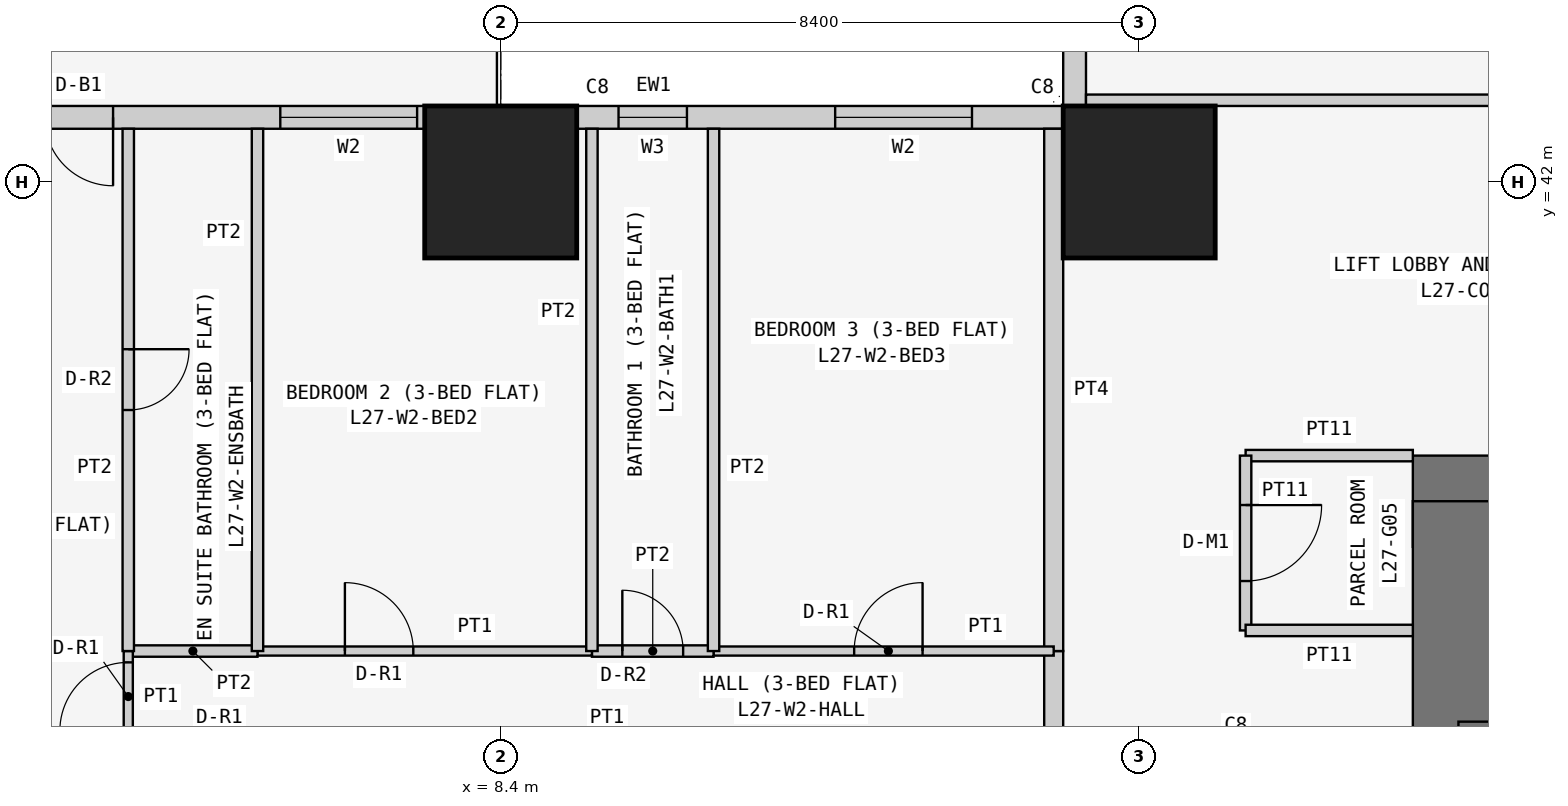
"""IFC4 building model, lengths in metres.
Left out: names, types, materials, properties, quantities, classifications, styles, units other than length and angle.
Written with IfcOpenShell. Run it as: python <this file> out.ifc"""

import sys

from ifc_helpers import new_model, si_unit, direction, frame, frame_2d, origin, origin_2d, place, context, subcontext, project, spatial, rectangle, extrude, element, fill, save


model = new_model("IFC4")
c1 = context("Model", 3, precision=1e-05, world=origin(), true_north=direction((0.0, 1.0)))
c2 = subcontext(c1, "Body", "Model", "MODEL_VIEW")
j1 = project(units=[si_unit("LENGTHUNIT", "METRE"), si_unit("PLANEANGLEUNIT", "RADIAN")], contexts=[c1])
p1 = place(None, origin())
s1 = spatial("IfcSite", under=j1, at=p1, CompositionType="ELEMENT")
p2 = place(p1, origin())
s2 = spatial("IfcBuilding", under=s1, at=p2, CompositionType="ELEMENT")
p3 = place(p2, frame((0.0, 0.0, 108.9)))
s3 = spatial("IfcBuildingStorey", under=s2, at=p3, CompositionType="ELEMENT", Elevation=108.9)
for number, where, z_axis, x_axis in (
    (1, (8.4, 42.0, 0.0), (0.0, 0.0, 1.0), (1.0, 0.0, 0.0)),
    (2, (16.8, 42.0, 0.0), (0.0, 0.0, 1.0), (1.0, 0.0, 0.0)),
):
    element("IfcColumn", number, at=place(p3, frame(where, z_axis=z_axis, x_axis=x_axis)), inside=s3, PredefinedType="COLUMN", context=c2, shape_type="SweptSolid", body=[
        extrude(rectangle(XDim=2.0, YDim=2.0, at=origin_2d()), origin(), (0.0, 0.0, 1.0), 3.6),
    ])
p4 = place(p3, frame((37.8, 37.8, 0.0), z_axis=(0.0, 0.0, 1.0), x_axis=(-1.0, 0.0, 0.0)))
e3 = element("IfcWall", 3, at=p4, inside=s3, PredefinedType="SHEAR", context=c2, shape_type="SweptSolid", body=[
    extrude(rectangle(XDim=17.4, YDim=1.2, at=frame_2d((8.7, 0.0))), origin(), (0.0, 0.0, 1.0), 3.6),
])
p5 = place(p3, frame((21.0, 37.8, 0.0), z_axis=(0.0, 0.0, 1.0), x_axis=(0.0, -1.0, 0.0)))
e4 = element("IfcWall", 4, at=p5, inside=s3, PredefinedType="SHEAR", context=c2, shape_type="SweptSolid", body=[
    extrude(rectangle(XDim=17.4, YDim=1.2, at=frame_2d((8.7, 0.0))), origin(), (0.0, 0.0, 1.0), 3.6),
])
p6 = place(p5, frame((5.4, 0.0, 0.0)))
e5 = element("IfcOpeningElement", 5, at=p6, cuts=e4, PredefinedType="OPENING", context=c2, shape_type="SweptSolid", body=[
    extrude(rectangle(XDim=1.2, YDim=2.1, at=frame_2d((0.6, 1.05))), frame((0.0, 0.61, 0.0), z_axis=(0.0, -1.0, 0.0), x_axis=(1.0, 0.0, 0.0)), (0.0, 0.0, 1.0), 1.22),
])
p7 = place(p3, frame((21.0, 34.6, 0.0), z_axis=(0.0, 0.0, 1.0), x_axis=(1.0, 0.0, 0.0)))
e6 = element("IfcWall", 6, at=p7, inside=s3, PredefinedType="SHEAR", context=c2, shape_type="SweptSolid", body=[
    extrude(rectangle(XDim=11.2, YDim=0.6, at=frame_2d((5.6, 0.0))), origin(), (0.0, 0.0, 1.0), 3.6),
])
p8 = place(p7, frame((9.35, 0.0, 0.0)))
e7 = element("IfcOpeningElement", 7, at=p8, cuts=e6, PredefinedType="OPENING", context=c2, shape_type="SweptSolid", body=[
    extrude(rectangle(XDim=0.9, YDim=2.1, at=frame_2d((0.45, 1.05))), frame((0.0, 0.31, 0.0), z_axis=(0.0, -1.0, 0.0), x_axis=(1.0, 0.0, 0.0)), (0.0, 0.0, 1.0), 0.62),
])
p9 = place(p7, frame((1.0, 0.0, 0.0)))
e8 = element("IfcOpeningElement", 8, at=p9, cuts=e6, PredefinedType="OPENING", context=c2, shape_type="SweptSolid", body=[
    extrude(rectangle(XDim=1.1, YDim=2.1, at=frame_2d((0.55, 1.05))), frame((0.0, 0.31, 0.0), z_axis=(0.0, -1.0, 0.0), x_axis=(1.0, 0.0, 0.0)), (0.0, 0.0, 1.0), 0.62),
])
p10 = place(p7, frame((3.65, 0.0, 0.0)))
e9 = element("IfcOpeningElement", 9, at=p10, cuts=e6, PredefinedType="OPENING", context=c2, shape_type="SweptSolid", body=[
    extrude(rectangle(XDim=1.1, YDim=2.1, at=frame_2d((0.55, 1.05))), frame((0.0, 0.31, 0.0), z_axis=(0.0, -1.0, 0.0), x_axis=(1.0, 0.0, 0.0)), (0.0, 0.0, 1.0), 0.62),
])
p11 = place(p7, frame((6.35, 0.0, 0.0)))
e10 = element("IfcOpeningElement", 10, at=p11, cuts=e6, PredefinedType="OPENING", context=c2, shape_type="SweptSolid", body=[
    extrude(rectangle(XDim=1.3, YDim=2.1, at=frame_2d((0.65, 1.05))), frame((0.0, 0.31, 0.0), z_axis=(0.0, -1.0, 0.0), x_axis=(1.0, 0.0, 0.0)), (0.0, 0.0, 1.0), 0.62),
])
p12 = place(p3, frame((15.8, 42.85, 0.0), z_axis=(0.0, 0.0, 1.0), x_axis=(-1.0, 0.0, 0.0)))
e11 = element("IfcWall", 11, at=p12, inside=s3, PredefinedType="SOLIDWALL", context=c2, shape_type="SweptSolid", body=[
    extrude(rectangle(XDim=15.4, YDim=0.3, at=frame_2d((7.7, 0.0))), origin(), (0.0, 0.0, 1.0), 3.45),
])
p13 = place(p12, frame((1.2, 0.0, 0.9)))
e12 = element("IfcOpeningElement", 12, at=p13, cuts=e11, PredefinedType="OPENING", context=c2, shape_type="SweptSolid", body=[
    extrude(rectangle(XDim=1.8, YDim=1.5, at=frame_2d((0.9, 0.75))), frame((0.0, 0.16, 0.0), z_axis=(0.0, -1.0, 0.0), x_axis=(1.0, 0.0, 0.0)), (0.0, 0.0, 1.0), 0.32),
])
p14 = place(p12, frame((4.95, 0.0, 1.5)))
e13 = element("IfcOpeningElement", 13, at=p14, cuts=e11, PredefinedType="OPENING", context=c2, shape_type="SweptSolid", body=[
    extrude(rectangle(XDim=0.9, YDim=0.7, at=frame_2d((0.45, 0.35))), frame((0.0, 0.16, 0.0), z_axis=(0.0, -1.0, 0.0), x_axis=(1.0, 0.0, 0.0)), (0.0, 0.0, 1.0), 0.32),
])
p15 = place(p12, frame((8.5, 0.0, 0.9)))
e14 = element("IfcOpeningElement", 14, at=p15, cuts=e11, PredefinedType="OPENING", context=c2, shape_type="SweptSolid", body=[
    extrude(rectangle(XDim=1.8, YDim=1.5, at=frame_2d((0.9, 0.75))), frame((0.0, 0.16, 0.0), z_axis=(0.0, -1.0, 0.0), x_axis=(1.0, 0.0, 0.0)), (0.0, 0.0, 1.0), 0.32),
])
p16 = place(p12, frame((12.5, 0.0, 0.0)))
e15 = element("IfcOpeningElement", 15, at=p16, cuts=e11, PredefinedType="OPENING", context=c2, shape_type="SweptSolid", body=[
    extrude(rectangle(XDim=0.9, YDim=2.4, at=frame_2d((0.45, 1.2))), frame((0.0, 0.16, 0.0), z_axis=(0.0, -1.0, 0.0), x_axis=(1.0, 0.0, 0.0)), (0.0, 0.0, 1.0), 0.32),
])
p17 = place(p12, frame((13.5, 0.0, 0.9)))
e16 = element("IfcOpeningElement", 16, at=p17, cuts=e11, PredefinedType="OPENING", context=c2, shape_type="SweptSolid", body=[
    extrude(rectangle(XDim=1.2, YDim=1.5, at=frame_2d((0.6, 0.75))), frame((0.0, 0.16, 0.0), z_axis=(0.0, -1.0, 0.0), x_axis=(1.0, 0.0, 0.0)), (0.0, 0.0, 1.0), 0.32),
])
p18 = place(p3, frame((15.95, 50.0, 0.0), z_axis=(0.0, 0.0, 1.0), x_axis=(0.0, -1.0, 0.0)))
e17 = element("IfcWall", 17, at=p18, inside=s3, PredefinedType="SOLIDWALL", context=c2, shape_type="SweptSolid", body=[
    extrude(rectangle(XDim=7.3, YDim=0.3, at=frame_2d((3.65, 0.0))), origin(), (0.0, 0.0, 1.0), 3.45),
])
p19 = place(p18, frame((3.1, 0.0, 0.9)))
e18 = element("IfcOpeningElement", 18, at=p19, cuts=e17, PredefinedType="OPENING", context=c2, shape_type="SweptSolid", body=[
    extrude(rectangle(XDim=2.4, YDim=1.5, at=frame_2d((1.2, 0.75))), frame((0.0, 0.16, 0.0), z_axis=(0.0, -1.0, 0.0), x_axis=(1.0, 0.0, 0.0)), (0.0, 0.0, 1.0), 0.32),
])
p20 = place(p18, frame((0.75, 0.0, 0.9)))
e19 = element("IfcOpeningElement", 19, at=p20, cuts=e17, PredefinedType="OPENING", context=c2, shape_type="SweptSolid", body=[
    extrude(rectangle(XDim=1.2, YDim=1.5, at=frame_2d((0.6, 0.75))), frame((0.0, 0.16, 0.0), z_axis=(0.0, -1.0, 0.0), x_axis=(1.0, 0.0, 0.0)), (0.0, 0.0, 1.0), 0.32),
])
p21 = place(p3, frame((20.4, 38.4, 0.0), z_axis=(0.0, 0.0, 1.0), x_axis=(-1.0, 0.0, 0.0)))
e20 = element("IfcWall", 20, at=p21, inside=s3, PredefinedType="PARTITIONING", context=c2, shape_type="SweptSolid", body=[
    extrude(rectangle(XDim=2.2, YDim=0.15, at=frame_2d((1.1, 0.0))), origin(), (0.0, 0.0, 1.0), 3.45),
])
p22 = place(p3, frame((18.2, 38.4, 0.0), z_axis=(0.0, 0.0, 1.0), x_axis=(0.0, -1.0, 0.0)))
e21 = element("IfcWall", 21, at=p22, inside=s3, PredefinedType="PARTITIONING", context=c2, shape_type="SweptSolid", body=[
    extrude(rectangle(XDim=2.3, YDim=0.15, at=frame_2d((1.15, 0.0))), origin(), (0.0, 0.0, 1.0), 3.45),
])
p23 = place(p22, frame((0.65, 0.0, 0.0)))
e22 = element("IfcOpeningElement", 22, at=p23, cuts=e21, PredefinedType="OPENING", context=c2, shape_type="SweptSolid", body=[
    extrude(rectangle(XDim=1.0, YDim=2.1, at=frame_2d((0.5, 1.05))), frame((0.0, 0.085, 0.0), z_axis=(0.0, -1.0, 0.0), x_axis=(1.0, 0.0, 0.0)), (0.0, 0.0, 1.0), 0.17),
])
p24 = place(p3, frame((18.2, 36.1, 0.0), z_axis=(0.0, 0.0, 1.0), x_axis=(1.0, 0.0, 0.0)))
e23 = element("IfcWall", 23, at=p24, inside=s3, PredefinedType="PARTITIONING", context=c2, shape_type="SweptSolid", body=[
    extrude(rectangle(XDim=2.2, YDim=0.15, at=frame_2d((1.1, 0.0))), origin(), (0.0, 0.0, 1.0), 3.45),
])
p25 = place(p3, frame((16.1, 43.075, 0.0), z_axis=(0.0, 0.0, 1.0), x_axis=(1.0, 0.0, 0.0)))
e24 = element("IfcWall", 24, at=p25, inside=s3, PredefinedType="PARTITIONING", context=c2, shape_type="SweptSolid", body=[
    extrude(rectangle(XDim=11.557, YDim=0.15, at=frame_2d((5.778, 0.0))), origin(), (0.0, 0.0, 1.0), 3.45),
])
p26 = place(p3, frame((15.675, 34.629, 0.0), z_axis=(0.0, 0.0, 1.0), x_axis=(0.0, 1.0, 0.0)))
e25 = element("IfcWall", 25, at=p26, inside=s3, PredefinedType="PARTITIONING", context=c2, shape_type="SweptSolid", body=[
    extrude(rectangle(XDim=1.2, YDim=0.25, at=frame_2d((0.6, 0.0))), origin(), (0.0, 0.0, 1.0), 3.45),
])
p27 = place(p3, frame((15.675, 35.829, 0.0), z_axis=(0.0, 0.0, 1.0), x_axis=(0.0, 1.0, 0.0)))
e26 = element("IfcWall", 26, at=p27, inside=s3, PredefinedType="PARTITIONING", context=c2, shape_type="SweptSolid", body=[
    extrude(rectangle(XDim=6.871, YDim=0.25, at=frame_2d((3.436, 0.0))), origin(), (0.0, 0.0, 1.0), 3.45),
])
p28 = place(p3, frame((11.2, 35.829, 0.0), z_axis=(0.0, 0.0, 1.0), x_axis=(1.0, 0.0, 0.0)))
e27 = element("IfcWall", 27, at=p28, inside=s3, PredefinedType="PARTITIONING", context=c2, shape_type="SweptSolid", body=[
    extrude(rectangle(XDim=4.475, YDim=0.12, at=frame_2d((2.238, 0.0))), origin(), (0.0, 0.0, 1.0), 3.45),
])
p29 = place(p28, frame((1.85, 0.0, 0.0)))
e28 = element("IfcOpeningElement", 28, at=p29, cuts=e27, PredefinedType="OPENING", context=c2, shape_type="SweptSolid", body=[
    extrude(rectangle(XDim=0.9, YDim=2.1, at=frame_2d((0.45, 1.05))), frame((0.0, 0.07, 0.0), z_axis=(0.0, -1.0, 0.0), x_axis=(1.0, 0.0, 0.0)), (0.0, 0.0, 1.0), 0.14),
])
p30 = place(p3, frame((9.6, 35.829, 0.0), z_axis=(0.0, 0.0, 1.0), x_axis=(1.0, 0.0, 0.0)))
e29 = element("IfcWall", 29, at=p30, inside=s3, PredefinedType="PARTITIONING", context=c2, shape_type="SweptSolid", body=[
    extrude(rectangle(XDim=1.6, YDim=0.15, at=frame_2d((0.8, 0.0))), origin(), (0.0, 0.0, 1.0), 3.45),
])
p31 = place(p30, frame((0.4, 0.0, 0.0)))
e30 = element("IfcOpeningElement", 30, at=p31, cuts=e29, PredefinedType="OPENING", context=c2, shape_type="SweptSolid", body=[
    extrude(rectangle(XDim=0.8, YDim=2.1, at=frame_2d((0.4, 1.05))), frame((0.0, 0.085, 0.0), z_axis=(0.0, -1.0, 0.0), x_axis=(1.0, 0.0, 0.0)), (0.0, 0.0, 1.0), 0.17),
])
p32 = place(p3, frame((5.2, 35.829, 0.0), z_axis=(0.0, 0.0, 1.0), x_axis=(1.0, 0.0, 0.0)))
e31 = element("IfcWall", 31, at=p32, inside=s3, PredefinedType="PARTITIONING", context=c2, shape_type="SweptSolid", body=[
    extrude(rectangle(XDim=4.4, YDim=0.12, at=frame_2d((2.2, 0.0))), origin(), (0.0, 0.0, 1.0), 3.45),
])
p33 = place(p32, frame((1.15, 0.0, 0.0)))
e32 = element("IfcOpeningElement", 32, at=p33, cuts=e31, PredefinedType="OPENING", context=c2, shape_type="SweptSolid", body=[
    extrude(rectangle(XDim=0.9, YDim=2.1, at=frame_2d((0.45, 1.05))), frame((0.0, 0.07, 0.0), z_axis=(0.0, -1.0, 0.0), x_axis=(1.0, 0.0, 0.0)), (0.0, 0.0, 1.0), 0.14),
])
p34 = place(p3, frame((3.5, 35.829, 0.0), z_axis=(0.0, 0.0, 1.0), x_axis=(1.0, 0.0, 0.0)))
e33 = element("IfcWall", 33, at=p34, inside=s3, PredefinedType="PARTITIONING", context=c2, shape_type="SweptSolid", body=[
    extrude(rectangle(XDim=1.7, YDim=0.15, at=frame_2d((0.85, 0.0))), origin(), (0.0, 0.0, 1.0), 3.45),
])
p35 = place(p3, frame((3.5, 34.629, 0.0), z_axis=(0.0, 0.0, 1.0), x_axis=(0.0, 1.0, 0.0)))
e34 = element("IfcWall", 34, at=p35, inside=s3, PredefinedType="PARTITIONING", context=c2, shape_type="SweptSolid", body=[
    extrude(rectangle(XDim=1.2, YDim=0.12, at=frame_2d((0.6, 0.0))), origin(), (0.0, 0.0, 1.0), 3.45),
])
p36 = place(p35, frame((0.151, 0.0, 0.0)))
e35 = element("IfcOpeningElement", 35, at=p36, cuts=e34, PredefinedType="OPENING", context=c2, shape_type="SweptSolid", body=[
    extrude(rectangle(XDim=0.9, YDim=2.1, at=frame_2d((0.45, 1.05))), frame((0.0, 0.07, 0.0), z_axis=(0.0, -1.0, 0.0), x_axis=(1.0, 0.0, 0.0)), (0.0, 0.0, 1.0), 0.14),
])
for number, where, z_axis, x_axis in (
    (36, (11.2, 35.829, 0.0), (0.0, 0.0, 1.0), (0.0, 1.0, 0.0)),
    (37, (9.6, 35.829, 0.0), (0.0, 0.0, 1.0), (0.0, 1.0, 0.0)),
    (38, (5.2, 35.829, 0.0), (0.0, 0.0, 1.0), (0.0, 1.0, 0.0)),
):
    element("IfcWall", number, at=place(p3, frame(where, z_axis=z_axis, x_axis=x_axis)), inside=s3, PredefinedType="PARTITIONING", context=c2, shape_type="SweptSolid", body=[
        extrude(rectangle(XDim=6.871, YDim=0.15, at=frame_2d((3.436, 0.0))), origin(), (0.0, 0.0, 1.0), 3.45),
    ])
p37 = place(p3, frame((3.5, 35.829, 0.0), z_axis=(0.0, 0.0, 1.0), x_axis=(0.0, 1.0, 0.0)))
e39 = element("IfcWall", 39, at=p37, inside=s3, PredefinedType="PARTITIONING", context=c2, shape_type="SweptSolid", body=[
    extrude(rectangle(XDim=6.871, YDim=0.15, at=frame_2d((3.436, 0.0))), origin(), (0.0, 0.0, 1.0), 3.45),
])
p38 = place(p37, frame((3.171, 0.0, 0.0)))
e40 = element("IfcOpeningElement", 40, at=p38, cuts=e39, PredefinedType="OPENING", context=c2, shape_type="SweptSolid", body=[
    extrude(rectangle(XDim=0.8, YDim=2.1, at=frame_2d((0.4, 1.05))), frame((0.0, 0.085, 0.0), z_axis=(0.0, -1.0, 0.0), x_axis=(1.0, 0.0, 0.0)), (0.0, 0.0, 1.0), 0.17),
])
p39 = place(p13, origin())
e41 = element("IfcWindow", 41, at=p39, inside=s3, PartitioningType="SINGLE_PANEL", PredefinedType="WINDOW", context=c2, shape_type="SweptSolid", body=[
    extrude(rectangle(XDim=1.8, YDim=1.5, at=frame_2d((0.9, 0.75))), frame((0.0, 0.03, 0.0), z_axis=(0.0, -1.0, 0.0), x_axis=(1.0, 0.0, 0.0)), (0.0, 0.0, 1.0), 0.06),
])
fill(e12, e41)
p40 = place(p14, origin())
e42 = element("IfcWindow", 42, at=p40, inside=s3, PartitioningType="SINGLE_PANEL", PredefinedType="WINDOW", context=c2, shape_type="SweptSolid", body=[
    extrude(rectangle(XDim=0.9, YDim=0.7, at=frame_2d((0.45, 0.35))), frame((0.0, 0.03, 0.0), z_axis=(0.0, -1.0, 0.0), x_axis=(1.0, 0.0, 0.0)), (0.0, 0.0, 1.0), 0.06),
])
fill(e13, e42)
p41 = place(p15, origin())
e43 = element("IfcWindow", 43, at=p41, inside=s3, PartitioningType="SINGLE_PANEL", PredefinedType="WINDOW", context=c2, shape_type="SweptSolid", body=[
    extrude(rectangle(XDim=1.8, YDim=1.5, at=frame_2d((0.9, 0.75))), frame((0.0, 0.03, 0.0), z_axis=(0.0, -1.0, 0.0), x_axis=(1.0, 0.0, 0.0)), (0.0, 0.0, 1.0), 0.06),
])
fill(e14, e43)
p42 = place(p16, origin())
e44 = element("IfcDoor", 44, at=p42, inside=s3, OperationType="SINGLE_SWING_LEFT", PredefinedType="DOOR", context=c2, shape_type="SweptSolid", body=[
    extrude(rectangle(XDim=0.9, YDim=2.4, at=frame_2d((0.45, 1.2))), frame((0.0, 0.025, 0.0), z_axis=(0.0, -1.0, 0.0), x_axis=(1.0, 0.0, 0.0)), (0.0, 0.0, 1.0), 0.05),
])
fill(e15, e44)
p43 = place(p23, origin())
e45 = element("IfcDoor", 45, at=p43, inside=s3, OperationType="SINGLE_SWING_LEFT", PredefinedType="DOOR", context=c2, shape_type="SweptSolid", body=[
    extrude(rectangle(XDim=1.0, YDim=2.1, at=frame_2d((0.5, 1.05))), frame((0.0, 0.025, 0.0), z_axis=(0.0, -1.0, 0.0), x_axis=(1.0, 0.0, 0.0)), (0.0, 0.0, 1.0), 0.05),
])
fill(e22, e45)
p44 = place(p29, origin())
e46 = element("IfcDoor", 46, at=p44, inside=s3, OperationType="SINGLE_SWING_RIGHT", PredefinedType="DOOR", context=c2, shape_type="SweptSolid", body=[
    extrude(rectangle(XDim=0.9, YDim=2.1, at=frame_2d((0.45, 1.05))), frame((0.0, 0.025, 0.0), z_axis=(0.0, -1.0, 0.0), x_axis=(1.0, 0.0, 0.0)), (0.0, 0.0, 1.0), 0.05),
])
fill(e28, e46)
p45 = place(p31, origin())
e47 = element("IfcDoor", 47, at=p45, inside=s3, OperationType="SINGLE_SWING_LEFT", PredefinedType="DOOR", context=c2, shape_type="SweptSolid", body=[
    extrude(rectangle(XDim=0.8, YDim=2.1, at=frame_2d((0.4, 1.05))), frame((0.0, 0.025, 0.0), z_axis=(0.0, -1.0, 0.0), x_axis=(1.0, 0.0, 0.0)), (0.0, 0.0, 1.0), 0.05),
])
fill(e30, e47)
p46 = place(p33, origin())
e48 = element("IfcDoor", 48, at=p46, inside=s3, OperationType="SINGLE_SWING_LEFT", PredefinedType="DOOR", context=c2, shape_type="SweptSolid", body=[
    extrude(rectangle(XDim=0.9, YDim=2.1, at=frame_2d((0.45, 1.05))), frame((0.0, 0.025, 0.0), z_axis=(0.0, -1.0, 0.0), x_axis=(1.0, 0.0, 0.0)), (0.0, 0.0, 1.0), 0.05),
])
fill(e32, e48)
p47 = place(p36, origin())
e49 = element("IfcDoor", 49, at=p47, inside=s3, OperationType="SINGLE_SWING_LEFT", PredefinedType="DOOR", context=c2, shape_type="SweptSolid", body=[
    extrude(rectangle(XDim=0.9, YDim=2.1, at=frame_2d((0.45, 1.05))), frame((0.0, 0.025, 0.0), z_axis=(0.0, -1.0, 0.0), x_axis=(1.0, 0.0, 0.0)), (0.0, 0.0, 1.0), 0.05),
])
fill(e35, e49)
p48 = place(p38, frame((0.8, 0.0, 0.0), z_axis=(0.0, 0.0, 1.0), x_axis=(-1.0, 0.0, 0.0)))
e50 = element("IfcDoor", 50, at=p48, inside=s3, OperationType="SINGLE_SWING_LEFT", PredefinedType="DOOR", context=c2, shape_type="SweptSolid", body=[
    extrude(rectangle(XDim=0.8, YDim=2.1, at=frame_2d((0.4, 1.05))), frame((0.0, 0.025, 0.0), z_axis=(0.0, -1.0, 0.0), x_axis=(1.0, 0.0, 0.0)), (0.0, 0.0, 1.0), 0.05),
])
fill(e40, e50)
save(model, sys.argv[1])
